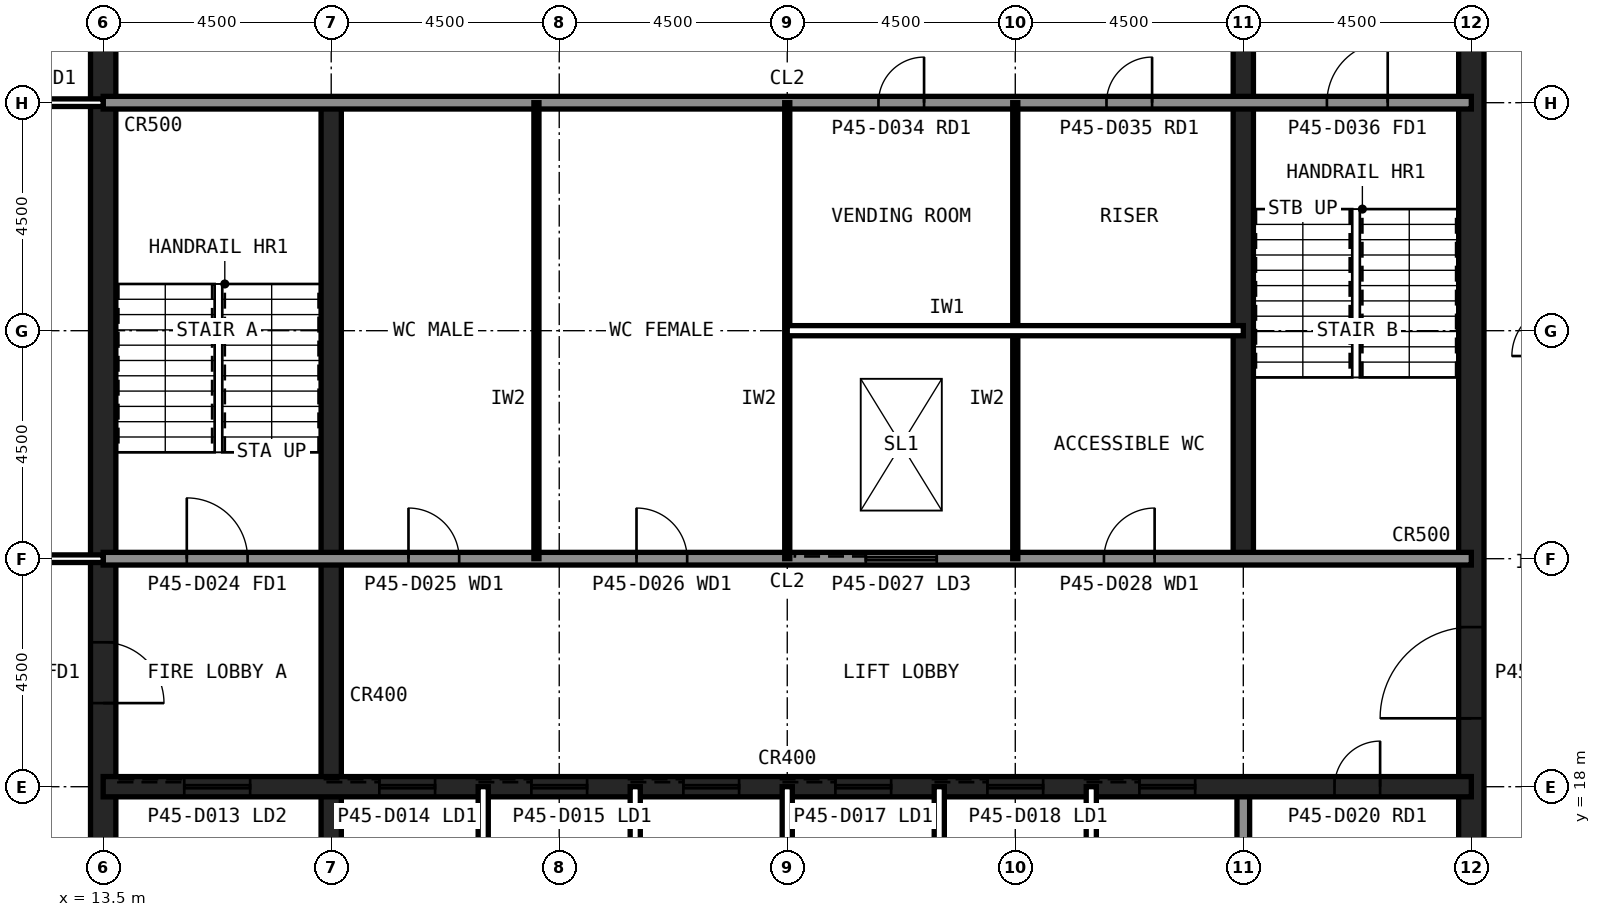
"""IFC4 building model, lengths in metres.
Left out: names, types, materials, properties, quantities, classifications, styles, units other than length and angle.
Written with IfcOpenShell. Run it as: python <this file> out.ifc"""

import sys

from ifc_helpers import new_model, si_unit, direction, frame, frame_2d, origin, place, context, subcontext, project, spatial, rectangle, extrude, element, fill, save


model = new_model("IFC4")
c1 = context("Model", 3, precision=1e-05, world=origin(), true_north=direction((0.0, 1.0)))
c2 = subcontext(c1, "Body", "Model", "MODEL_VIEW")
j1 = project(units=[si_unit("LENGTHUNIT", "METRE"), si_unit("PLANEANGLEUNIT", "RADIAN")], contexts=[c1])
p1 = place(None, origin())
s1 = spatial("IfcSite", under=j1, at=p1, CompositionType="ELEMENT")
p2 = place(p1, origin())
s2 = spatial("IfcBuilding", under=s1, at=p2, CompositionType="ELEMENT")
p3 = place(p2, frame((0.0, 0.0, 191.6)))
s3 = spatial("IfcBuildingStorey", under=s2, at=p3, CompositionType="ELEMENT", Elevation=191.6)
p4 = place(p3, frame((40.5, 13.5, 0.0), z_axis=(0.0, 0.0, 1.0), x_axis=(0.0, 1.0, 0.0)))
e1 = element("IfcWall", 1, at=p4, inside=s3, PredefinedType="SHEAR", context=c2, shape_type="SweptSolid", body=[
    extrude(rectangle(XDim=27.0, YDim=0.5, at=frame_2d((13.5, 0.0))), origin(), (0.0, 0.0, 1.0), 4.0),
])
p5 = place(p4, frame((5.85, 0.0, 0.0)))
e2 = element("IfcOpeningElement", 2, at=p5, cuts=e1, PredefinedType="OPENING", context=c2, shape_type="SweptSolid", body=[
    extrude(rectangle(XDim=1.8, YDim=2.1, at=frame_2d((0.9, 1.05))), frame((0.0, 0.26, 0.0), z_axis=(0.0, -1.0, 0.0), x_axis=(1.0, 0.0, 0.0)), (0.0, 0.0, 1.0), 0.52),
])
p6 = place(p4, frame((19.65, 0.0, 0.0)))
e3 = element("IfcOpeningElement", 3, at=p6, cuts=e1, PredefinedType="OPENING", context=c2, shape_type="SweptSolid", body=[
    extrude(rectangle(XDim=1.2, YDim=2.1, at=frame_2d((0.6, 1.05))), frame((0.0, 0.26, 0.0), z_axis=(0.0, -1.0, 0.0), x_axis=(1.0, 0.0, 0.0)), (0.0, 0.0, 1.0), 0.52),
])
p7 = place(p3, frame((13.5, 40.5, 0.0), z_axis=(0.0, 0.0, 1.0), x_axis=(0.0, -1.0, 0.0)))
e4 = element("IfcWall", 4, at=p7, inside=s3, PredefinedType="SHEAR", context=c2, shape_type="SweptSolid", body=[
    extrude(rectangle(XDim=27.0, YDim=0.5, at=frame_2d((13.5, 0.0))), origin(), (0.0, 0.0, 1.0), 4.0),
])
p8 = place(p7, frame((19.65, 0.0, 0.0)))
e5 = element("IfcOpeningElement", 5, at=p8, cuts=e4, PredefinedType="OPENING", context=c2, shape_type="SweptSolid", body=[
    extrude(rectangle(XDim=1.2, YDim=2.1, at=frame_2d((0.6, 1.05))), frame((0.0, 0.26, 0.0), z_axis=(0.0, -1.0, 0.0), x_axis=(1.0, 0.0, 0.0)), (0.0, 0.0, 1.0), 0.52),
])
p9 = place(p7, frame((5.85, 0.0, 0.0)))
e6 = element("IfcOpeningElement", 6, at=p9, cuts=e4, PredefinedType="OPENING", context=c2, shape_type="SweptSolid", body=[
    extrude(rectangle(XDim=1.8, YDim=2.1, at=frame_2d((0.9, 1.05))), frame((0.0, 0.26, 0.0), z_axis=(0.0, -1.0, 0.0), x_axis=(1.0, 0.0, 0.0)), (0.0, 0.0, 1.0), 0.52),
])
p10 = place(p3, frame((18.0, 13.5, 0.0), z_axis=(0.0, 0.0, 1.0), x_axis=(0.0, 1.0, 0.0)))
e7 = element("IfcWall", 7, at=p10, inside=s3, PredefinedType="SHEAR", context=c2, shape_type="SweptSolid", body=[
    extrude(rectangle(XDim=18.0, YDim=0.4, at=frame_2d((9.0, 0.0))), origin(), (0.0, 0.0, 1.0), 4.0),
])
p11 = place(p3, frame((36.0, 13.5, 0.0), z_axis=(0.0, 0.0, 1.0), x_axis=(0.0, 1.0, 0.0)))
e8 = element("IfcWall", 8, at=p11, inside=s3, PredefinedType="SOLIDWALL", context=c2, shape_type="SweptSolid", body=[
    extrude(rectangle(XDim=4.5, YDim=0.25, at=frame_2d((2.25, 0.0))), origin(), (0.0, 0.0, 1.0), 3.84),
])
p12 = place(p3, frame((36.0, 22.5, 0.0), z_axis=(0.0, 0.0, 1.0), x_axis=(0.0, 1.0, 0.0)))
e9 = element("IfcWall", 9, at=p12, inside=s3, PredefinedType="SHEAR", context=c2, shape_type="SweptSolid", body=[
    extrude(rectangle(XDim=18.0, YDim=0.4, at=frame_2d((9.0, 0.0))), origin(), (0.0, 0.0, 1.0), 4.0),
])
p13 = place(p3, frame((13.5, 18.0, 0.0), z_axis=(0.0, 0.0, 1.0), x_axis=(1.0, 0.0, 0.0)))
e10 = element("IfcWall", 10, at=p13, inside=s3, PredefinedType="SHEAR", context=c2, shape_type="SweptSolid", body=[
    extrude(rectangle(XDim=27.0, YDim=0.4, at=frame_2d((13.5, 0.0))), origin(), (0.0, 0.0, 1.0), 4.0),
])
p14 = place(p13, frame((24.3, 0.0, 0.0)))
e11 = element("IfcOpeningElement", 11, at=p14, cuts=e10, PredefinedType="OPENING", context=c2, shape_type="SweptSolid", body=[
    extrude(rectangle(XDim=0.9, YDim=2.1, at=frame_2d((0.45, 1.05))), frame((0.0, 0.21, 0.0), z_axis=(0.0, -1.0, 0.0), x_axis=(1.0, 0.0, 0.0)), (0.0, 0.0, 1.0), 0.42),
])
p15 = place(p13, frame((5.45, 0.0, 0.0)))
e12 = element("IfcOpeningElement", 12, at=p15, cuts=e10, PredefinedType="OPENING", context=c2, shape_type="SweptSolid", body=[
    extrude(rectangle(XDim=1.1, YDim=2.1, at=frame_2d((0.55, 1.05))), frame((0.0, 0.21, 0.0), z_axis=(0.0, -1.0, 0.0), x_axis=(1.0, 0.0, 0.0)), (0.0, 0.0, 1.0), 0.42),
])
p16 = place(p13, frame((8.45, 0.0, 0.0)))
e13 = element("IfcOpeningElement", 13, at=p16, cuts=e10, PredefinedType="OPENING", context=c2, shape_type="SweptSolid", body=[
    extrude(rectangle(XDim=1.1, YDim=2.1, at=frame_2d((0.55, 1.05))), frame((0.0, 0.21, 0.0), z_axis=(0.0, -1.0, 0.0), x_axis=(1.0, 0.0, 0.0)), (0.0, 0.0, 1.0), 0.42),
])
p17 = place(p13, frame((11.45, 0.0, 0.0)))
e14 = element("IfcOpeningElement", 14, at=p17, cuts=e10, PredefinedType="OPENING", context=c2, shape_type="SweptSolid", body=[
    extrude(rectangle(XDim=1.1, YDim=2.1, at=frame_2d((0.55, 1.05))), frame((0.0, 0.21, 0.0), z_axis=(0.0, -1.0, 0.0), x_axis=(1.0, 0.0, 0.0)), (0.0, 0.0, 1.0), 0.42),
])
p18 = place(p13, frame((14.45, 0.0, 0.0)))
e15 = element("IfcOpeningElement", 15, at=p18, cuts=e10, PredefinedType="OPENING", context=c2, shape_type="SweptSolid", body=[
    extrude(rectangle(XDim=1.1, YDim=2.1, at=frame_2d((0.55, 1.05))), frame((0.0, 0.21, 0.0), z_axis=(0.0, -1.0, 0.0), x_axis=(1.0, 0.0, 0.0)), (0.0, 0.0, 1.0), 0.42),
])
p19 = place(p13, frame((17.45, 0.0, 0.0)))
e16 = element("IfcOpeningElement", 16, at=p19, cuts=e10, PredefinedType="OPENING", context=c2, shape_type="SweptSolid", body=[
    extrude(rectangle(XDim=1.1, YDim=2.1, at=frame_2d((0.55, 1.05))), frame((0.0, 0.21, 0.0), z_axis=(0.0, -1.0, 0.0), x_axis=(1.0, 0.0, 0.0)), (0.0, 0.0, 1.0), 0.42),
])
p20 = place(p13, frame((20.45, 0.0, 0.0)))
e17 = element("IfcOpeningElement", 17, at=p20, cuts=e10, PredefinedType="OPENING", context=c2, shape_type="SweptSolid", body=[
    extrude(rectangle(XDim=1.1, YDim=2.1, at=frame_2d((0.55, 1.05))), frame((0.0, 0.21, 0.0), z_axis=(0.0, -1.0, 0.0), x_axis=(1.0, 0.0, 0.0)), (0.0, 0.0, 1.0), 0.42),
])
p21 = place(p13, frame((1.6, 0.0, 0.0)))
e18 = element("IfcOpeningElement", 18, at=p21, cuts=e10, PredefinedType="OPENING", context=c2, shape_type="SweptSolid", body=[
    extrude(rectangle(XDim=1.3, YDim=2.2, at=frame_2d((0.65, 1.1))), frame((0.0, 0.21, 0.0), z_axis=(0.0, -1.0, 0.0), x_axis=(1.0, 0.0, 0.0)), (0.0, 0.0, 1.0), 0.42),
])
p22 = place(p3, frame((13.5, 22.5, 0.0), z_axis=(0.0, 0.0, 1.0), x_axis=(1.0, 0.0, 0.0)))
e19 = element("IfcWall", 19, at=p22, inside=s3, PredefinedType="SOLIDWALL", context=c2, shape_type="SweptSolid", body=[
    extrude(rectangle(XDim=27.0, YDim=0.25, at=frame_2d((13.5, 0.0))), origin(), (0.0, 0.0, 1.0), 3.84),
])
p23 = place(p22, frame((1.65, 0.0, 0.0)))
e20 = element("IfcOpeningElement", 20, at=p23, cuts=e19, PredefinedType="OPENING", context=c2, shape_type="SweptSolid", body=[
    extrude(rectangle(XDim=1.2, YDim=2.1, at=frame_2d((0.6, 1.05))), frame((0.0, 0.135, 0.0), z_axis=(0.0, -1.0, 0.0), x_axis=(1.0, 0.0, 0.0)), (0.0, 0.0, 1.0), 0.27),
])
p24 = place(p22, frame((6.025, 0.0, 0.0)))
e21 = element("IfcOpeningElement", 21, at=p24, cuts=e19, PredefinedType="OPENING", context=c2, shape_type="SweptSolid", body=[
    extrude(rectangle(XDim=1.0, YDim=2.1, at=frame_2d((0.5, 1.05))), frame((0.0, 0.135, 0.0), z_axis=(0.0, -1.0, 0.0), x_axis=(1.0, 0.0, 0.0)), (0.0, 0.0, 1.0), 0.27),
])
p25 = place(p22, frame((10.525, 0.0, 0.0)))
e22 = element("IfcOpeningElement", 22, at=p25, cuts=e19, PredefinedType="OPENING", context=c2, shape_type="SweptSolid", body=[
    extrude(rectangle(XDim=1.0, YDim=2.1, at=frame_2d((0.5, 1.05))), frame((0.0, 0.135, 0.0), z_axis=(0.0, -1.0, 0.0), x_axis=(1.0, 0.0, 0.0)), (0.0, 0.0, 1.0), 0.27),
])
p26 = place(p22, frame((19.75, 0.0, 0.0)))
e23 = element("IfcOpeningElement", 23, at=p26, cuts=e19, PredefinedType="OPENING", context=c2, shape_type="SweptSolid", body=[
    extrude(rectangle(XDim=1.0, YDim=2.1, at=frame_2d((0.5, 1.05))), frame((0.0, 0.135, 0.0), z_axis=(0.0, -1.0, 0.0), x_axis=(1.0, 0.0, 0.0)), (0.0, 0.0, 1.0), 0.27),
])
p27 = place(p22, frame((15.05, 0.0, 0.0)))
e24 = element("IfcOpeningElement", 24, at=p27, cuts=e19, PredefinedType="OPENING", context=c2, shape_type="SweptSolid", body=[
    extrude(rectangle(XDim=1.4, YDim=2.4, at=frame_2d((0.7, 1.2))), frame((0.0, 0.135, 0.0), z_axis=(0.0, -1.0, 0.0), x_axis=(1.0, 0.0, 0.0)), (0.0, 0.0, 1.0), 0.27),
])
p28 = place(p3, frame((13.5, 31.5, 0.0), z_axis=(0.0, 0.0, 1.0), x_axis=(1.0, 0.0, 0.0)))
e25 = element("IfcWall", 25, at=p28, inside=s3, PredefinedType="SOLIDWALL", context=c2, shape_type="SweptSolid", body=[
    extrude(rectangle(XDim=27.0, YDim=0.25, at=frame_2d((13.5, 0.0))), origin(), (0.0, 0.0, 1.0), 3.84),
])
p29 = place(p28, frame((24.15, 0.0, 0.0)))
e26 = element("IfcOpeningElement", 26, at=p29, cuts=e25, PredefinedType="OPENING", context=c2, shape_type="SweptSolid", body=[
    extrude(rectangle(XDim=1.2, YDim=2.1, at=frame_2d((0.6, 1.05))), frame((0.0, 0.135, 0.0), z_axis=(0.0, -1.0, 0.0), x_axis=(1.0, 0.0, 0.0)), (0.0, 0.0, 1.0), 0.27),
])
p30 = place(p28, frame((15.3, 0.0, 0.0)))
e27 = element("IfcOpeningElement", 27, at=p30, cuts=e25, PredefinedType="OPENING", context=c2, shape_type="SweptSolid", body=[
    extrude(rectangle(XDim=0.9, YDim=2.1, at=frame_2d((0.45, 1.05))), frame((0.0, 0.135, 0.0), z_axis=(0.0, -1.0, 0.0), x_axis=(1.0, 0.0, 0.0)), (0.0, 0.0, 1.0), 0.27),
])
p31 = place(p28, frame((19.8, 0.0, 0.0)))
e28 = element("IfcOpeningElement", 28, at=p31, cuts=e25, PredefinedType="OPENING", context=c2, shape_type="SweptSolid", body=[
    extrude(rectangle(XDim=0.9, YDim=2.1, at=frame_2d((0.45, 1.05))), frame((0.0, 0.135, 0.0), z_axis=(0.0, -1.0, 0.0), x_axis=(1.0, 0.0, 0.0)), (0.0, 0.0, 1.0), 0.27),
])
for number, where, z_axis, x_axis in (
    (29, (21.0, 13.5, 0.0), (0.0, 0.0, 1.0), (0.0, 1.0, 0.0)),
    (30, (24.0, 13.5, 0.0), (0.0, 0.0, 1.0), (0.0, 1.0, 0.0)),
    (31, (27.0, 13.5, 0.0), (0.0, 0.0, 1.0), (0.0, 1.0, 0.0)),
    (32, (30.0, 13.5, 0.0), (0.0, 0.0, 1.0), (0.0, 1.0, 0.0)),
    (33, (33.0, 13.5, 0.0), (0.0, 0.0, 1.0), (0.0, 1.0, 0.0)),
):
    element("IfcWall", number, at=place(p3, frame(where, z_axis=z_axis, x_axis=x_axis)), inside=s3, PredefinedType="PARTITIONING", context=c2, shape_type="SweptSolid", body=[
        extrude(rectangle(XDim=4.5, YDim=0.2, at=frame_2d((2.25, 0.0))), origin(), (0.0, 0.0, 1.0), 3.84),
    ])
for number, where, z_axis, x_axis in (
    (34, (22.05, 22.5, 0.0), (0.0, 0.0, 1.0), (0.0, 1.0, 0.0)),
    (35, (27.0, 22.5, 0.0), (0.0, 0.0, 1.0), (0.0, 1.0, 0.0)),
    (36, (31.5, 22.5, 0.0), (0.0, 0.0, 1.0), (0.0, 1.0, 0.0)),
):
    element("IfcWall", number, at=place(p3, frame(where, z_axis=z_axis, x_axis=x_axis)), inside=s3, PredefinedType="PLUMBINGWALL", context=c2, shape_type="SweptSolid", body=[
        extrude(rectangle(XDim=9.0, YDim=0.1, at=frame_2d((4.5, 0.0))), origin(), (0.0, 0.0, 1.0), 3.84),
    ])
p32 = place(p3, frame((27.0, 27.0, 0.0), z_axis=(0.0, 0.0, 1.0), x_axis=(1.0, 0.0, 0.0)))
e37 = element("IfcWall", 37, at=p32, inside=s3, PredefinedType="PARTITIONING", context=c2, shape_type="SweptSolid", body=[
    extrude(rectangle(XDim=9.0, YDim=0.2, at=frame_2d((4.5, 0.0))), origin(), (0.0, 0.0, 1.0), 3.84),
])
p33 = place(p3, frame((9.9, 22.5, 0.0), z_axis=(0.0, 0.0, 1.0), x_axis=(1.0, 0.0, 0.0)))
e38 = element("IfcWall", 38, at=p33, inside=s3, PredefinedType="PARTITIONING", context=c2, shape_type="SweptSolid", body=[
    extrude(rectangle(XDim=3.6, YDim=0.15, at=frame_2d((1.8, 0.0))), origin(), (0.0, 0.0, 1.0), 2.989),
])
p34 = place(p3, frame((13.5, 31.5, 0.0), z_axis=(0.0, 0.0, 1.0), x_axis=(-1.0, 0.0, 0.0)))
e39 = element("IfcWall", 39, at=p34, inside=s3, PredefinedType="PARTITIONING", context=c2, shape_type="SweptSolid", body=[
    extrude(rectangle(XDim=3.6, YDim=0.15, at=frame_2d((1.8, 0.0))), origin(), (0.0, 0.0, 1.0), 2.989),
])
p35 = place(p34, frame((1.3, 0.0, 0.0)))
e40 = element("IfcOpeningElement", 40, at=p35, cuts=e39, PredefinedType="OPENING", context=c2, shape_type="SweptSolid", body=[
    extrude(rectangle(XDim=1.0, YDim=2.1, at=frame_2d((0.5, 1.05))), frame((0.0, 0.085, 0.0), z_axis=(0.0, -1.0, 0.0), x_axis=(1.0, 0.0, 0.0)), (0.0, 0.0, 1.0), 0.17),
])
p36 = place(p8, origin())
e41 = element("IfcDoor", 41, at=p36, inside=s3, OperationType="SINGLE_SWING_RIGHT", PredefinedType="DOOR", context=c2, shape_type="SweptSolid", body=[
    extrude(rectangle(XDim=1.2, YDim=2.1, at=frame_2d((0.6, 1.05))), frame((0.0, 0.025, 0.0), z_axis=(0.0, -1.0, 0.0), x_axis=(1.0, 0.0, 0.0)), (0.0, 0.0, 1.0), 0.05),
])
fill(e5, e41)
p37 = place(p5, origin())
e42 = element("IfcDoor", 42, at=p37, inside=s3, OperationType="SINGLE_SWING_LEFT", PredefinedType="DOOR", context=c2, shape_type="SweptSolid", body=[
    extrude(rectangle(XDim=1.8, YDim=2.1, at=frame_2d((0.9, 1.05))), frame((0.0, 0.025, 0.0), z_axis=(0.0, -1.0, 0.0), x_axis=(1.0, 0.0, 0.0)), (0.0, 0.0, 1.0), 0.05),
])
fill(e2, e42)
p38 = place(p23, origin())
e43 = element("IfcDoor", 43, at=p38, inside=s3, OperationType="SINGLE_SWING_LEFT", PredefinedType="DOOR", context=c2, shape_type="SweptSolid", body=[
    extrude(rectangle(XDim=1.2, YDim=2.1, at=frame_2d((0.6, 1.05))), frame((0.0, 0.025, 0.0), z_axis=(0.0, -1.0, 0.0), x_axis=(1.0, 0.0, 0.0)), (0.0, 0.0, 1.0), 0.05),
])
fill(e20, e43)
p39 = place(p29, origin())
e44 = element("IfcDoor", 44, at=p39, inside=s3, OperationType="SINGLE_SWING_RIGHT", PredefinedType="DOOR", context=c2, shape_type="SweptSolid", body=[
    extrude(rectangle(XDim=1.2, YDim=2.1, at=frame_2d((0.6, 1.05))), frame((0.0, 0.025, 0.0), z_axis=(0.0, -1.0, 0.0), x_axis=(1.0, 0.0, 0.0)), (0.0, 0.0, 1.0), 0.05),
])
fill(e26, e44)
p40 = place(p24, origin())
e45 = element("IfcDoor", 45, at=p40, inside=s3, OperationType="SINGLE_SWING_LEFT", PredefinedType="DOOR", context=c2, shape_type="SweptSolid", body=[
    extrude(rectangle(XDim=1.0, YDim=2.1, at=frame_2d((0.5, 1.05))), frame((0.0, 0.025, 0.0), z_axis=(0.0, -1.0, 0.0), x_axis=(1.0, 0.0, 0.0)), (0.0, 0.0, 1.0), 0.05),
])
fill(e21, e45)
p41 = place(p25, origin())
e46 = element("IfcDoor", 46, at=p41, inside=s3, OperationType="SINGLE_SWING_LEFT", PredefinedType="DOOR", context=c2, shape_type="SweptSolid", body=[
    extrude(rectangle(XDim=1.0, YDim=2.1, at=frame_2d((0.5, 1.05))), frame((0.0, 0.025, 0.0), z_axis=(0.0, -1.0, 0.0), x_axis=(1.0, 0.0, 0.0)), (0.0, 0.0, 1.0), 0.05),
])
fill(e22, e46)
p42 = place(p26, origin())
e47 = element("IfcDoor", 47, at=p42, inside=s3, OperationType="SINGLE_SWING_RIGHT", PredefinedType="DOOR", context=c2, shape_type="SweptSolid", body=[
    extrude(rectangle(XDim=1.0, YDim=2.1, at=frame_2d((0.5, 1.05))), frame((0.0, 0.025, 0.0), z_axis=(0.0, -1.0, 0.0), x_axis=(1.0, 0.0, 0.0)), (0.0, 0.0, 1.0), 0.05),
])
fill(e23, e47)
p43 = place(p30, origin())
e48 = element("IfcDoor", 48, at=p43, inside=s3, OperationType="SINGLE_SWING_RIGHT", PredefinedType="DOOR", context=c2, shape_type="SweptSolid", body=[
    extrude(rectangle(XDim=0.9, YDim=2.1, at=frame_2d((0.45, 1.05))), frame((0.0, 0.025, 0.0), z_axis=(0.0, -1.0, 0.0), x_axis=(1.0, 0.0, 0.0)), (0.0, 0.0, 1.0), 0.05),
])
fill(e27, e48)
p44 = place(p31, origin())
e49 = element("IfcDoor", 49, at=p44, inside=s3, OperationType="SINGLE_SWING_RIGHT", PredefinedType="DOOR", context=c2, shape_type="SweptSolid", body=[
    extrude(rectangle(XDim=0.9, YDim=2.1, at=frame_2d((0.45, 1.05))), frame((0.0, 0.025, 0.0), z_axis=(0.0, -1.0, 0.0), x_axis=(1.0, 0.0, 0.0)), (0.0, 0.0, 1.0), 0.05),
])
fill(e28, e49)
p45 = place(p14, origin())
e50 = element("IfcDoor", 50, at=p45, inside=s3, OperationType="SINGLE_SWING_RIGHT", PredefinedType="DOOR", context=c2, shape_type="SweptSolid", body=[
    extrude(rectangle(XDim=0.9, YDim=2.1, at=frame_2d((0.45, 1.05))), frame((0.0, 0.025, 0.0), z_axis=(0.0, -1.0, 0.0), x_axis=(1.0, 0.0, 0.0)), (0.0, 0.0, 1.0), 0.05),
])
fill(e11, e50)
p46 = place(p15, origin())
e51 = element("IfcDoor", 51, at=p46, inside=s3, OperationType="SLIDING_TO_LEFT", PredefinedType="DOOR", context=c2, shape_type="SweptSolid", body=[
    extrude(rectangle(XDim=1.1, YDim=2.1, at=frame_2d((0.55, 1.05))), frame((0.0, 0.025, 0.0), z_axis=(0.0, -1.0, 0.0), x_axis=(1.0, 0.0, 0.0)), (0.0, 0.0, 1.0), 0.05),
])
fill(e12, e51)
p47 = place(p16, origin())
e52 = element("IfcDoor", 52, at=p47, inside=s3, OperationType="SLIDING_TO_LEFT", PredefinedType="DOOR", context=c2, shape_type="SweptSolid", body=[
    extrude(rectangle(XDim=1.1, YDim=2.1, at=frame_2d((0.55, 1.05))), frame((0.0, 0.025, 0.0), z_axis=(0.0, -1.0, 0.0), x_axis=(1.0, 0.0, 0.0)), (0.0, 0.0, 1.0), 0.05),
])
fill(e13, e52)
p48 = place(p17, origin())
e53 = element("IfcDoor", 53, at=p48, inside=s3, OperationType="SLIDING_TO_LEFT", PredefinedType="DOOR", context=c2, shape_type="SweptSolid", body=[
    extrude(rectangle(XDim=1.1, YDim=2.1, at=frame_2d((0.55, 1.05))), frame((0.0, 0.025, 0.0), z_axis=(0.0, -1.0, 0.0), x_axis=(1.0, 0.0, 0.0)), (0.0, 0.0, 1.0), 0.05),
])
fill(e14, e53)
p49 = place(p18, origin())
e54 = element("IfcDoor", 54, at=p49, inside=s3, OperationType="SLIDING_TO_LEFT", PredefinedType="DOOR", context=c2, shape_type="SweptSolid", body=[
    extrude(rectangle(XDim=1.1, YDim=2.1, at=frame_2d((0.55, 1.05))), frame((0.0, 0.025, 0.0), z_axis=(0.0, -1.0, 0.0), x_axis=(1.0, 0.0, 0.0)), (0.0, 0.0, 1.0), 0.05),
])
fill(e15, e54)
p50 = place(p19, origin())
e55 = element("IfcDoor", 55, at=p50, inside=s3, OperationType="SLIDING_TO_LEFT", PredefinedType="DOOR", context=c2, shape_type="SweptSolid", body=[
    extrude(rectangle(XDim=1.1, YDim=2.1, at=frame_2d((0.55, 1.05))), frame((0.0, 0.025, 0.0), z_axis=(0.0, -1.0, 0.0), x_axis=(1.0, 0.0, 0.0)), (0.0, 0.0, 1.0), 0.05),
])
fill(e16, e55)
p51 = place(p20, origin())
e56 = element("IfcDoor", 56, at=p51, inside=s3, OperationType="SLIDING_TO_LEFT", PredefinedType="DOOR", context=c2, shape_type="SweptSolid", body=[
    extrude(rectangle(XDim=1.1, YDim=2.1, at=frame_2d((0.55, 1.05))), frame((0.0, 0.025, 0.0), z_axis=(0.0, -1.0, 0.0), x_axis=(1.0, 0.0, 0.0)), (0.0, 0.0, 1.0), 0.05),
])
fill(e17, e56)
p52 = place(p21, origin())
e57 = element("IfcDoor", 57, at=p52, inside=s3, OperationType="SLIDING_TO_LEFT", PredefinedType="DOOR", context=c2, shape_type="SweptSolid", body=[
    extrude(rectangle(XDim=1.3, YDim=2.2, at=frame_2d((0.65, 1.1))), frame((0.0, 0.025, 0.0), z_axis=(0.0, -1.0, 0.0), x_axis=(1.0, 0.0, 0.0)), (0.0, 0.0, 1.0), 0.05),
])
fill(e18, e57)
p53 = place(p27, origin())
e58 = element("IfcDoor", 58, at=p53, inside=s3, OperationType="SLIDING_TO_LEFT", PredefinedType="DOOR", context=c2, shape_type="SweptSolid", body=[
    extrude(rectangle(XDim=1.4, YDim=2.4, at=frame_2d((0.7, 1.2))), frame((0.0, 0.025, 0.0), z_axis=(0.0, -1.0, 0.0), x_axis=(1.0, 0.0, 0.0)), (0.0, 0.0, 1.0), 0.05),
])
fill(e24, e58)
save(model, sys.argv[1])
